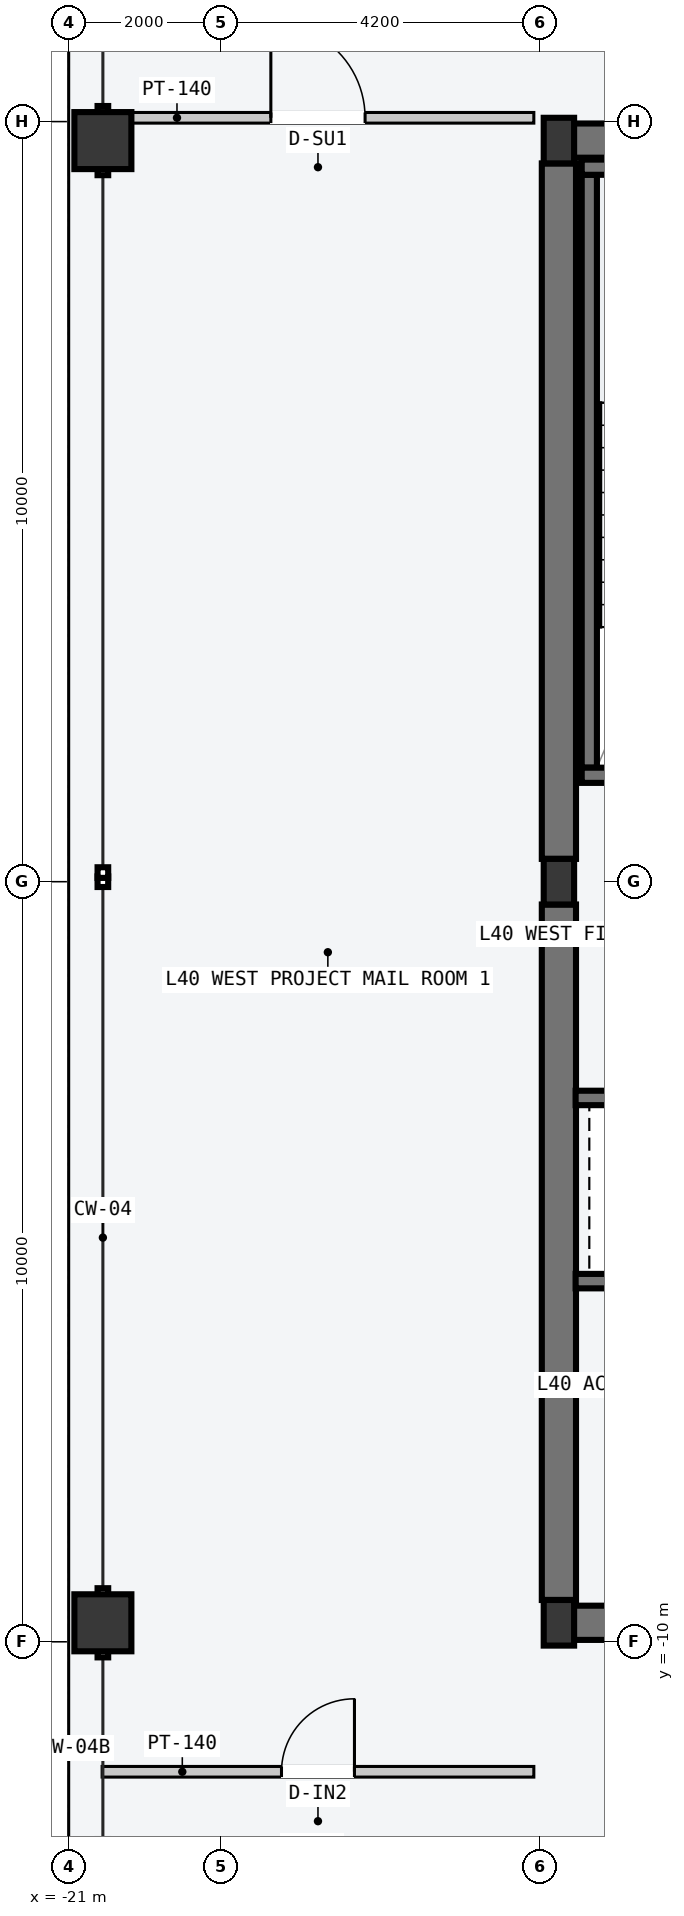
"""IFC4 building model, lengths in metres.
Left out: names, types, materials, properties, quantities, classifications, styles, units other than length and angle.
Written with IfcOpenShell. Run it as: python <this file> out.ifc"""

import sys

from ifc_helpers import new_model, si_unit, direction, frame, frame_2d, origin, origin_2d, place, context, subcontext, project, spatial, rectangle, hollow_rectangle, i_section, extrude, element, fill, save


model = new_model("IFC4")
c1 = context("Model", 3, precision=1e-05, world=origin(), true_north=direction((0.0, 1.0)))
c2 = subcontext(c1, "Body", "Model", "MODEL_VIEW")
j1 = project(units=[si_unit("LENGTHUNIT", "METRE"), si_unit("PLANEANGLEUNIT", "RADIAN")], contexts=[c1])
p1 = place(None, origin())
s1 = spatial("IfcSite", under=j1, at=p1, CompositionType="ELEMENT")
p2 = place(p1, origin())
s2 = spatial("IfcBuilding", under=s1, at=p2, CompositionType="ELEMENT")
p3 = place(p2, frame((0.0, 0.0, 155.1)))
s3 = spatial("IfcBuildingStorey", under=s2, at=p3, CompositionType="ELEMENT", Elevation=155.1)
for number, where, z_axis, x_axis in (
    (1, (-14.53, -9.75, -0.2), (0.0, 0.0, 1.0), (1.0, 0.0, 0.0)),
    (2, (-14.53, 9.75, -0.2), (0.0, 0.0, 1.0), (1.0, 0.0, 0.0)),
):
    element("IfcWall", number, at=place(p3, frame(where, z_axis=z_axis, x_axis=x_axis)), inside=s3, PredefinedType="SHEAR", context=c2, shape_type="SweptSolid", body=[
        extrude(rectangle(XDim=6.46, YDim=0.45, at=frame_2d((3.23, 0.0))), origin(), (0.0, 0.0, 1.0), 3.6),
    ])
for number, where, z_axis, x_axis in (
    (3, (-14.55, -9.45, -0.2), (0.0, 0.0, 1.0), (0.0, 1.0, 0.0)),
    (4, (-14.55, 0.3, -0.2), (0.0, 0.0, 1.0), (0.0, 1.0, 0.0)),
):
    element("IfcWall", number, at=place(p3, frame(where, z_axis=z_axis, x_axis=x_axis)), inside=s3, PredefinedType="SHEAR", context=c2, shape_type="SweptSolid", body=[
        extrude(rectangle(XDim=9.15, YDim=0.45, at=frame_2d((4.575, 0.0))), origin(), (0.0, 0.0, 1.0), 3.6),
    ])
p4 = place(p3, frame((-14.15, 1.5, -0.2), z_axis=(0.0, 0.0, 1.0), x_axis=(0.0, 1.0, 0.0)))
e5 = element("IfcWall", 5, at=p4, inside=s3, PredefinedType="SOLIDWALL", context=c2, shape_type="SweptSolid", body=[
    extrude(rectangle(XDim=7.8, YDim=0.2, at=frame_2d((3.9, 0.0))), origin(), (0.0, 0.0, 1.0), 3.6),
])
p5 = place(p3, frame((-14.25, 1.4, -0.2), z_axis=(0.0, 0.0, 1.0), x_axis=(1.0, 0.0, 0.0)))
e6 = element("IfcWall", 6, at=p5, inside=s3, PredefinedType="SOLIDWALL", context=c2, shape_type="SweptSolid", body=[
    extrude(rectangle(XDim=3.72, YDim=0.2, at=frame_2d((1.86, 0.0))), origin(), (0.0, 0.0, 1.0), 3.6),
])
p6 = place(p5, frame((1.5, 0.0, 0.2)))
e7 = element("IfcOpeningElement", 7, at=p6, cuts=e6, PredefinedType="OPENING", context=c2, shape_type="SweptSolid", body=[
    extrude(rectangle(XDim=1.12, YDim=2.18, at=frame_2d((0.56, 1.09))), frame((0.0, 0.11, 0.0), z_axis=(0.0, -1.0, 0.0), x_axis=(1.0, 0.0, 0.0)), (0.0, 0.0, 1.0), 0.22),
])
p7 = place(p3, frame((-14.25, 9.4, -0.2), z_axis=(0.0, 0.0, 1.0), x_axis=(1.0, 0.0, 0.0)))
e8 = element("IfcWall", 8, at=p7, inside=s3, PredefinedType="SOLIDWALL", context=c2, shape_type="SweptSolid", body=[
    extrude(rectangle(XDim=3.72, YDim=0.2, at=frame_2d((1.86, 0.0))), origin(), (0.0, 0.0, 1.0), 3.6),
])
for number, where, z_axis, x_axis in (
    (9, (-14.55, -9.75, 0.0), (0.0, 0.0, 1.0), (1.0, 0.0, 0.0)),
    (10, (-14.55, 0.0, 0.0), (0.0, 0.0, 1.0), (1.0, 0.0, 0.0)),
    (11, (-14.55, 9.75, 0.0), (0.0, 0.0, 1.0), (1.0, 0.0, 0.0)),
):
    element("IfcColumn", number, at=place(p3, frame(where, z_axis=z_axis, x_axis=x_axis)), inside=s3, PredefinedType="COLUMN", context=c2, shape_type="SweptSolid", body=[
        extrude(i_section(OverallWidth=0.4, OverallDepth=0.6, WebThickness=0.022, FlangeThickness=0.036, at=origin_2d()), origin(), (0.0, 0.0, 1.0), 3.6),
    ])
for number, where, z_axis, x_axis in (
    (12, (-20.55, -9.75, 0.0), (0.0, 0.0, 1.0), (0.0, 1.0, 0.0)),
    (13, (-20.55, 9.75, 0.0), (0.0, 0.0, 1.0), (0.0, 1.0, 0.0)),
):
    element("IfcColumn", number, at=place(p3, frame(where, z_axis=z_axis, x_axis=x_axis)), inside=s3, PredefinedType="COLUMN", context=c2, shape_type="SweptSolid", body=[
        extrude(hollow_rectangle(XDim=0.75, YDim=0.75, WallThickness=0.032, at=origin_2d()), origin(), (0.0, 0.0, 1.0), 3.6),
    ])
p8 = place(p3, frame((-14.33, -2.845, -0.2), z_axis=(0.0, 0.0, 1.0), x_axis=(1.0, 0.0, 0.0)))
e14 = element("IfcWall", 14, at=p8, inside=s3, PredefinedType="SOLIDWALL", context=c2, shape_type="SweptSolid", body=[
    extrude(rectangle(XDim=2.68, YDim=0.19, at=frame_2d((1.34, 0.0))), origin(), (0.0, 0.0, 1.0), 3.6),
])
p9 = place(p8, frame((0.83, 0.0, 0.2)))
e15 = element("IfcOpeningElement", 15, at=p9, cuts=e14, PredefinedType="OPENING", context=c2, shape_type="SweptSolid", body=[
    extrude(rectangle(XDim=1.2, YDim=2.2, at=frame_2d((0.6, 1.1))), frame((0.0, 0.105, 0.0), z_axis=(0.0, -1.0, 0.0), x_axis=(1.0, 0.0, 0.0)), (0.0, 0.0, 1.0), 0.21),
])
p10 = place(p3, frame((-14.33, -5.255, -0.2), z_axis=(0.0, 0.0, 1.0), x_axis=(1.0, 0.0, 0.0)))
e16 = element("IfcWall", 16, at=p10, inside=s3, PredefinedType="SOLIDWALL", context=c2, shape_type="SweptSolid", body=[
    extrude(rectangle(XDim=2.68, YDim=0.19, at=frame_2d((1.34, 0.0))), origin(), (0.0, 0.0, 1.0), 3.6),
])
p11 = place(p3, frame((-20.56, 10.05, 0.0), z_axis=(0.0, 0.0, 1.0), x_axis=(1.0, 0.0, 0.0)))
e17 = element("IfcWall", 17, at=p11, inside=s3, PredefinedType="PARTITIONING", context=c2, shape_type="SweptSolid", body=[
    extrude(rectangle(XDim=5.68, YDim=0.14, at=frame_2d((2.84, 0.0))), origin(), (0.0, 0.0, 1.0), 3.4),
])
p12 = place(p11, frame((2.22, 0.0, 0.0)))
e18 = element("IfcOpeningElement", 18, at=p12, cuts=e17, PredefinedType="OPENING", context=c2, shape_type="SweptSolid", body=[
    extrude(rectangle(XDim=1.24, YDim=2.24, at=frame_2d((0.62, 1.12))), frame((0.0, 0.08, 0.0), z_axis=(0.0, -1.0, 0.0), x_axis=(1.0, 0.0, 0.0)), (0.0, 0.0, 1.0), 0.16),
])
p13 = place(p3, frame((-20.56, -11.71, 0.0), z_axis=(0.0, 0.0, 1.0), x_axis=(1.0, 0.0, 0.0)))
e19 = element("IfcWall", 19, at=p13, inside=s3, PredefinedType="PARTITIONING", context=c2, shape_type="SweptSolid", body=[
    extrude(rectangle(XDim=5.68, YDim=0.14, at=frame_2d((2.84, 0.0))), origin(), (0.0, 0.0, 1.0), 3.4),
])
p14 = place(p13, frame((2.36, 0.0, 0.0)))
e20 = element("IfcOpeningElement", 20, at=p14, cuts=e19, PredefinedType="OPENING", context=c2, shape_type="SweptSolid", body=[
    extrude(rectangle(XDim=0.96, YDim=2.18, at=frame_2d((0.48, 1.09))), frame((0.0, 0.08, 0.0), z_axis=(0.0, -1.0, 0.0), x_axis=(1.0, 0.0, 0.0)), (0.0, 0.0, 1.0), 0.16),
])
p15 = place(p12, origin())
e21 = element("IfcDoor", 21, at=p15, inside=s3, OperationType="SINGLE_SWING_LEFT", PredefinedType="DOOR", context=c2, shape_type="SweptSolid", body=[
    extrude(rectangle(XDim=1.24, YDim=2.24, at=frame_2d((0.62, 1.12))), frame((0.0, 0.025, 0.0), z_axis=(0.0, -1.0, 0.0), x_axis=(1.0, 0.0, 0.0)), (0.0, 0.0, 1.0), 0.05),
])
fill(e18, e21)
p16 = place(p14, origin())
e22 = element("IfcDoor", 22, at=p16, inside=s3, OperationType="SINGLE_SWING_RIGHT", PredefinedType="DOOR", context=c2, shape_type="SweptSolid", body=[
    extrude(rectangle(XDim=0.96, YDim=2.18, at=frame_2d((0.48, 1.09))), frame((0.0, 0.025, 0.0), z_axis=(0.0, -1.0, 0.0), x_axis=(1.0, 0.0, 0.0)), (0.0, 0.0, 1.0), 0.05),
])
fill(e20, e22)
save(model, sys.argv[1])
